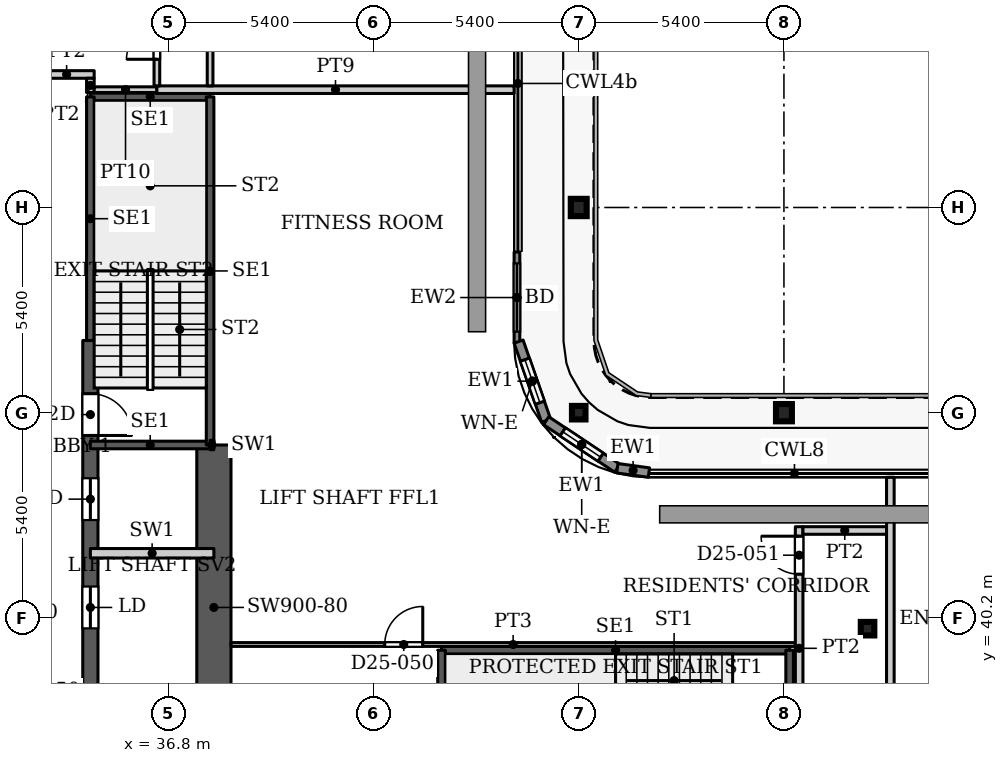
"""IFC4 building model, lengths in metres.
Left out: names, types, materials, properties, quantities, classifications, styles, units other than length and angle.
Written with IfcOpenShell. Run it as: python <this file> out.ifc"""

import sys

from ifc_helpers import new_model, si_unit, direction, frame, frame_2d, origin, origin_2d, place, context, subcontext, project, spatial, rectangle, hollow_rectangle, i_section, extrude, source, transform, mapped, element, fill, save


model = new_model("IFC4")
c1 = context("Model", 3, precision=1e-05, world=origin(), true_north=direction((0.0, 1.0)))
c2 = subcontext(c1, "Body", "Model", "MODEL_VIEW")
j1 = project(units=[si_unit("LENGTHUNIT", "METRE"), si_unit("PLANEANGLEUNIT", "RADIAN")], contexts=[c1])
p1 = place(None, origin())
s1 = spatial("IfcSite", under=j1, at=p1, CompositionType="ELEMENT")
p2 = place(p1, origin())
s2 = spatial("IfcBuilding", under=s1, at=p2, CompositionType="ELEMENT")
p3 = place(p2, frame((0.0, 0.0, 109.7)))
s3 = spatial("IfcBuildingStorey", under=s2, at=p3, CompositionType="ELEMENT", Elevation=109.7)
for number, where, z_axis, x_axis in (
    (1, (53.0, 45.6, 0.0), (0.0, 0.0, 1.0), (1.0, 0.0, 0.0)),
    (2, (47.6, 51.0, 0.0), (0.0, 0.0, 1.0), (1.0, 0.0, 0.0)),
):
    element("IfcColumn", number, at=place(p3, frame(where, z_axis=z_axis, x_axis=x_axis)), inside=s3, PredefinedType="COLUMN", context=c2, shape_type="SweptSolid", body=[
        extrude(i_section(OverallWidth=0.418, OverallDepth=0.455, WebThickness=0.042, FlangeThickness=0.068, FilletRadius=0.014, at=origin_2d()), origin(), (0.0, 0.0, 1.0), 3.9),
    ])
for number, where, z_axis, x_axis in (
    (3, (55.2, 39.916, 0.0), (0.0, 0.0, 1.0), (1.0, 0.0, 0.0)),
    (4, (47.6, 45.6, 0.0), (0.0, 0.0, 1.0), (1.0, 0.0, 0.0)),
):
    element("IfcColumn", number, at=place(p3, frame(where, z_axis=z_axis, x_axis=x_axis)), inside=s3, PredefinedType="COLUMN", context=c2, shape_type="SweptSolid", body=[
        extrude(hollow_rectangle(XDim=0.356, YDim=0.356, WallThickness=0.016, InnerFilletRadius=0.016, OuterFilletRadius=0.032, at=origin_2d()), origin(), (0.0, 0.0, 1.0), 3.9),
    ])
p4 = place(p3, frame((34.75, 29.05, 0.0), z_axis=(0.0, 0.0, 1.0), x_axis=(0.0, 1.0, 0.0)))
e5 = element("IfcWall", 5, at=p4, inside=s3, PredefinedType="SHEAR", context=c2, shape_type="SweptSolid", body=[
    extrude(rectangle(XDim=18.45, YDim=0.4, at=frame_2d((9.225, 0.0))), origin(), (0.0, 0.0, 1.0), 3.9),
])
p5 = place(p4, frame((8.025, 0.0, 0.0)))
e6 = element("IfcOpeningElement", 6, at=p5, cuts=e5, PredefinedType="OPENING", context=c2, shape_type="SweptSolid", body=[
    extrude(rectangle(XDim=1.1, YDim=2.2, at=frame_2d((0.55, 1.1))), frame((0.0, 0.21, 0.0), z_axis=(0.0, -1.0, 0.0), x_axis=(1.0, 0.0, 0.0)), (0.0, 0.0, 1.0), 0.42),
])
p6 = place(p4, frame((10.875, 0.0, 0.0)))
e7 = element("IfcOpeningElement", 7, at=p6, cuts=e5, PredefinedType="OPENING", context=c2, shape_type="SweptSolid", body=[
    extrude(rectangle(XDim=1.1, YDim=2.2, at=frame_2d((0.55, 1.1))), frame((0.0, 0.21, 0.0), z_axis=(0.0, -1.0, 0.0), x_axis=(1.0, 0.0, 0.0)), (0.0, 0.0, 1.0), 0.42),
])
p7 = place(p4, frame((13.725, 0.0, 0.0)))
e8 = element("IfcOpeningElement", 8, at=p7, cuts=e5, PredefinedType="OPENING", context=c2, shape_type="SweptSolid", body=[
    extrude(rectangle(XDim=1.1, YDim=2.2, at=frame_2d((0.55, 1.1))), frame((0.0, 0.21, 0.0), z_axis=(0.0, -1.0, 0.0), x_axis=(1.0, 0.0, 0.0)), (0.0, 0.0, 1.0), 0.42),
])
p8 = place(p4, frame((15.95, 0.0, 0.0)))
e9 = element("IfcOpeningElement", 9, at=p8, cuts=e5, PredefinedType="OPENING", context=c2, shape_type="SweptSolid", body=[
    extrude(rectangle(XDim=1.1, YDim=2.2, at=frame_2d((0.55, 1.1))), frame((0.0, 0.21, 0.0), z_axis=(0.0, -1.0, 0.0), x_axis=(1.0, 0.0, 0.0)), (0.0, 0.0, 1.0), 0.42),
])
p9 = place(p3, frame((38.0, 36.2, 0.0), z_axis=(0.0, 0.0, 1.0), x_axis=(0.0, 1.0, 0.0)))
e10 = element("IfcWall", 10, at=p9, inside=s3, PredefinedType="SHEAR", context=c2, shape_type="SweptSolid", body=[
    extrude(rectangle(XDim=8.55, YDim=0.9, at=frame_2d((4.275, 0.0))), origin(), (0.0, 0.0, 1.0), 3.9),
])
p10 = place(p3, frame((45.975, 49.83, 0.0), z_axis=(0.0, 0.0, 1.0), x_axis=(0.0, -1.0, 0.0)))
e11 = element("IfcWall", 11, at=p10, inside=s3, PredefinedType="SOLIDWALL", context=c2, shape_type="SweptSolid", body=[
    extrude(rectangle(XDim=2.4, YDim=0.15, at=frame_2d((1.2, 0.0))), origin(), (0.0, 0.0, 1.0), 3.75),
])
p11 = place(p10, frame((0.3, 0.0, 0.0)))
e12 = element("IfcOpeningElement", 12, at=p11, cuts=e11, PredefinedType="OPENING", context=c2, shape_type="SweptSolid", body=[
    extrude(rectangle(XDim=1.8, YDim=2.4, at=frame_2d((0.9, 1.2))), frame((0.0, 0.085, 0.0), z_axis=(0.0, -1.0, 0.0), x_axis=(1.0, 0.0, 0.0)), (0.0, 0.0, 1.0), 0.17),
])
p12 = place(p3, frame((46.018, 47.471, 0.0), z_axis=(0.0, 0.0, 1.0), x_axis=(0.328791208903, -0.944402637093, 0.0)))
e13 = element("IfcWall", 13, at=p12, inside=s3, PredefinedType="SOLIDWALL", context=c2, shape_type="SweptSolid", body=[
    extrude(rectangle(XDim=2.205, YDim=0.25, at=frame_2d((1.102, 0.0))), origin(), (0.0, 0.0, 1.0), 3.75),
])
p13 = place(p12, frame((0.503, 0.0, 0.6)))
e14 = element("IfcOpeningElement", 14, at=p13, cuts=e13, PredefinedType="OPENING", context=c2, shape_type="SweptSolid", body=[
    extrude(rectangle(XDim=1.2, YDim=2.1, at=frame_2d((0.6, 1.05))), frame((0.0, 0.135, 0.0), z_axis=(0.0, -1.0, 0.0), x_axis=(1.0, 0.0, 0.0)), (0.0, 0.0, 1.0), 0.27),
])
p14 = place(p3, frame((46.743, 45.389, 0.0), z_axis=(0.0, 0.0, 1.0), x_axis=(0.831449265529, -0.555600682912, 0.0)))
e15 = element("IfcWall", 15, at=p14, inside=s3, PredefinedType="SOLIDWALL", context=c2, shape_type="SweptSolid", body=[
    extrude(rectangle(XDim=2.251, YDim=0.25, at=frame_2d((1.126, 0.0))), origin(), (0.0, 0.0, 1.0), 3.75),
])
p15 = place(p14, frame((0.525, 0.0, 0.6)))
e16 = element("IfcOpeningElement", 16, at=p15, cuts=e15, PredefinedType="OPENING", context=c2, shape_type="SweptSolid", body=[
    extrude(rectangle(XDim=1.2, YDim=2.1, at=frame_2d((0.6, 1.05))), frame((0.0, 0.135, 0.0), z_axis=(0.0, -1.0, 0.0), x_axis=(1.0, 0.0, 0.0)), (0.0, 0.0, 1.0), 0.27),
])
p16 = place(p3, frame((48.615, 44.138, 0.0), z_axis=(0.0, 0.0, 1.0), x_axis=(0.990741504246, -0.135761819977, 0.0)))
e17 = element("IfcWall", 17, at=p16, inside=s3, PredefinedType="SOLIDWALL", context=c2, shape_type="SweptSolid", body=[
    extrude(rectangle(XDim=0.84, YDim=0.25, at=frame_2d((0.42, 0.0))), origin(), (0.0, 0.0, 1.0), 3.75),
])
p17 = place(p3, frame((43.99, 39.35, 0.0), z_axis=(0.0, 0.0, 1.0), x_axis=(1.0, 0.0, 0.0)))
e18 = element("IfcWall", 18, at=p17, inside=s3, PredefinedType="SHEAR", context=c2, shape_type="SweptSolid", body=[
    extrude(rectangle(XDim=9.16, YDim=0.2, at=frame_2d((4.58, 0.0))), origin(), (0.0, 0.0, 1.0), 3.9),
])
for number, where, z_axis, x_axis in (
    (19, (43.99, 36.2, 0.0), (0.0, 0.0, 1.0), (0.0, 1.0, 0.0)),
    (20, (53.15, 36.2, 0.0), (0.0, 0.0, 1.0), (0.0, 1.0, 0.0)),
):
    element("IfcWall", number, at=place(p3, frame(where, z_axis=z_axis, x_axis=x_axis)), inside=s3, PredefinedType="SHEAR", context=c2, shape_type="SweptSolid", body=[
        extrude(rectangle(XDim=3.15, YDim=0.2, at=frame_2d((1.575, 0.0))), origin(), (0.0, 0.0, 1.0), 3.9),
    ])
for number, where, z_axis, x_axis in (
    (21, (34.75, 44.75, 0.0), (0.0, 0.0, 1.0), (1.0, 0.0, 0.0)),
    (22, (34.75, 53.91, 0.0), (0.0, 0.0, 1.0), (1.0, 0.0, 0.0)),
):
    element("IfcWall", number, at=place(p3, frame(where, z_axis=z_axis, x_axis=x_axis)), inside=s3, PredefinedType="SHEAR", context=c2, shape_type="SweptSolid", body=[
        extrude(rectangle(XDim=3.15, YDim=0.2, at=frame_2d((1.575, 0.0))), origin(), (0.0, 0.0, 1.0), 3.9),
    ])
p18 = place(p3, frame((34.75, 47.5, 0.0), z_axis=(0.0, 0.0, 1.0), x_axis=(0.0, 1.0, 0.0)))
e23 = element("IfcWall", 23, at=p18, inside=s3, PredefinedType="SHEAR", context=c2, shape_type="SweptSolid", body=[
    extrude(rectangle(XDim=6.41, YDim=0.2, at=frame_2d((3.205, 0.0))), origin(), (0.0, 0.0, 1.0), 3.9),
])
p19 = place(p3, frame((37.9, 44.75, 0.0), z_axis=(0.0, 0.0, 1.0), x_axis=(0.0, 1.0, 0.0)))
e24 = element("IfcWall", 24, at=p19, inside=s3, PredefinedType="SHEAR", context=c2, shape_type="SweptSolid", body=[
    extrude(rectangle(XDim=9.16, YDim=0.2, at=frame_2d((4.58, 0.0))), origin(), (0.0, 0.0, 1.0), 3.9),
])
p20 = place(p3, frame((34.75, 41.9, 0.0), z_axis=(0.0, 0.0, 1.0), x_axis=(1.0, 0.0, 0.0)))
e25 = element("IfcWall", 25, at=p20, inside=s3, PredefinedType="PARTITIONING", context=c2, shape_type="SweptSolid", body=[
    extrude(rectangle(XDim=3.25, YDim=0.25, at=frame_2d((1.625, 0.0))), origin(), (0.0, 0.0, 1.0), 3.9),
])
p21 = place(p3, frame((37.9, 44.75, 0.0), z_axis=(0.0, 0.0, 1.0), x_axis=(1.0, 0.0, 0.0)))
e26 = element("IfcWall", 26, at=p21, inside=s3, PredefinedType="PARTITIONING", context=c2, shape_type="SweptSolid", body=[
    extrude(rectangle(XDim=0.1, YDim=0.25, at=frame_2d((0.05, 0.0))), origin(), (0.0, 0.0, 1.0), 3.9),
])
p22 = place(p3, frame((33.4, 54.5, 0.0), z_axis=(0.0, 0.0, 1.0), x_axis=(1.0, 0.0, 0.0)))
e27 = element("IfcWall", 27, at=p22, inside=s3, PredefinedType="PARTITIONING", context=c2, shape_type="SweptSolid", body=[
    extrude(rectangle(XDim=1.45, YDim=0.2, at=frame_2d((0.725, 0.0))), origin(), (0.0, 0.0, 1.0), 3.6),
])
p23 = place(p3, frame((34.75, 54.025, 0.0), z_axis=(0.0, 0.0, 1.0), x_axis=(0.0, 1.0, 0.0)))
e28 = element("IfcWall", 28, at=p23, inside=s3, PredefinedType="PARTITIONING", context=c2, shape_type="SweptSolid", body=[
    extrude(rectangle(XDim=0.375, YDim=0.2, at=frame_2d((0.188, 0.0))), origin(), (0.0, 0.0, 1.0), 3.6),
])
p24 = place(p3, frame((34.85, 54.1, 0.0), z_axis=(0.0, 0.0, 1.0), x_axis=(1.0, 0.0, 0.0)))
e29 = element("IfcWall", 29, at=p24, inside=s3, PredefinedType="PARTITIONING", context=c2, shape_type="SweptSolid", body=[
    extrude(rectangle(XDim=1.65, YDim=0.15, at=frame_2d((0.825, 0.0))), origin(), (0.0, 0.0, 1.0), 3.6),
])
p25 = place(p3, frame((36.5, 54.1, 0.0), z_axis=(0.0, 0.0, 1.0), x_axis=(1.0, 0.0, 0.0)))
e30 = element("IfcWall", 30, at=p25, inside=s3, PredefinedType="PARTITIONING", context=c2, shape_type="SweptSolid", body=[
    extrude(rectangle(XDim=9.4, YDim=0.2, at=frame_2d((4.7, 0.0))), origin(), (0.0, 0.0, 1.0), 3.6),
])
p26 = place(p3, frame((36.5, 54.2, 0.0), z_axis=(0.0, 0.0, 1.0), x_axis=(0.0, 1.0, 0.0)))
e31 = element("IfcWall", 31, at=p26, inside=s3, PredefinedType="PARTITIONING", context=c2, shape_type="SweptSolid", body=[
    extrude(rectangle(XDim=2.225, YDim=0.15, at=frame_2d((1.113, 0.0))), origin(), (0.0, 0.0, 1.0), 3.6),
])
p27 = place(p26, frame((0.7, 0.0, 0.0)))
e32 = element("IfcOpeningElement", 32, at=p27, cuts=e31, PredefinedType="OPENING", context=c2, shape_type="SweptSolid", body=[
    extrude(rectangle(XDim=0.8, YDim=2.1, at=frame_2d((0.4, 1.05))), frame((0.0, 0.085, 0.0), z_axis=(0.0, -1.0, 0.0), x_axis=(1.0, 0.0, 0.0)), (0.0, 0.0, 1.0), 0.17),
])
p28 = place(p3, frame((37.9, 54.2, 0.0), z_axis=(0.0, 0.0, 1.0), x_axis=(0.0, 1.0, 0.0)))
e33 = element("IfcWall", 33, at=p28, inside=s3, PredefinedType="PARTITIONING", context=c2, shape_type="SweptSolid", body=[
    extrude(rectangle(XDim=9.1, YDim=0.15, at=frame_2d((4.55, 0.0))), origin(), (0.0, 0.0, 1.0), 3.6),
])
p29 = place(p28, frame((6.8, 0.0, 0.0)))
e34 = element("IfcOpeningElement", 34, at=p29, cuts=e33, PredefinedType="OPENING", context=c2, shape_type="SweptSolid", body=[
    extrude(rectangle(XDim=0.9, YDim=2.1, at=frame_2d((0.45, 1.05))), frame((0.0, 0.085, 0.0), z_axis=(0.0, -1.0, 0.0), x_axis=(1.0, 0.0, 0.0)), (0.0, 0.0, 1.0), 0.17),
])
p30 = place(p28, frame((2.1, 0.0, 0.0)))
e35 = element("IfcOpeningElement", 35, at=p30, cuts=e33, PredefinedType="OPENING", context=c2, shape_type="SweptSolid", body=[
    extrude(rectangle(XDim=1.0, YDim=2.1, at=frame_2d((0.5, 1.05))), frame((0.0, 0.085, 0.0), z_axis=(0.0, -1.0, 0.0), x_axis=(1.0, 0.0, 0.0)), (0.0, 0.0, 1.0), 0.17),
])
p31 = place(p3, frame((38.449, 39.5, 0.0), z_axis=(0.0, 0.0, 1.0), x_axis=(1.0, 0.0, 0.0)))
e36 = element("IfcWall", 36, at=p31, inside=s3, PredefinedType="PARTITIONING", context=c2, shape_type="SweptSolid", body=[
    extrude(rectangle(XDim=14.851, YDim=0.1, at=frame_2d((7.426, 0.0))), origin(), (0.0, 0.0, 1.0), 3.6),
])
p32 = place(p31, frame((4.047, 0.0, 0.0)))
e37 = element("IfcOpeningElement", 37, at=p32, cuts=e36, PredefinedType="OPENING", context=c2, shape_type="SweptSolid", body=[
    extrude(rectangle(XDim=1.0, YDim=2.1, at=frame_2d((0.5, 1.05))), frame((0.0, 0.06, 0.0), z_axis=(0.0, -1.0, 0.0), x_axis=(1.0, 0.0, 0.0)), (0.0, 0.0, 1.0), 0.12),
])
p33 = place(p3, frame((53.4, 36.199, 0.0), z_axis=(0.0, 0.0, 1.0), x_axis=(0.0, 1.0, 0.0)))
e38 = element("IfcWall", 38, at=p33, inside=s3, PredefinedType="PARTITIONING", context=c2, shape_type="SweptSolid", body=[
    extrude(rectangle(XDim=6.401, YDim=0.2, at=frame_2d((3.201, 0.0))), origin(), (0.0, 0.0, 1.0), 3.6),
])
p34 = place(p33, frame((5.151, 0.0, 0.0)))
e39 = element("IfcOpeningElement", 39, at=p34, cuts=e38, PredefinedType="OPENING", context=c2, shape_type="SweptSolid", body=[
    extrude(rectangle(XDim=1.0, YDim=2.1, at=frame_2d((0.5, 1.05))), frame((0.0, 0.11, 0.0), z_axis=(0.0, -1.0, 0.0), x_axis=(1.0, 0.0, 0.0)), (0.0, 0.0, 1.0), 0.22),
])
p35 = place(p3, frame((53.5, 42.5, 0.0), z_axis=(0.0, 0.0, 1.0), x_axis=(1.0, 0.0, 0.0)))
e40 = element("IfcWall", 40, at=p35, inside=s3, PredefinedType="PARTITIONING", context=c2, shape_type="SweptSolid", body=[
    extrude(rectangle(XDim=2.2, YDim=0.2, at=frame_2d((1.1, 0.0))), origin(), (0.0, 0.0, 1.0), 3.6),
])
p36 = place(p3, frame((55.8, 30.4, 0.0), z_axis=(0.0, 0.0, 1.0), x_axis=(0.0, 1.0, 0.0)))
e41 = element("IfcWall", 41, at=p36, inside=s3, PredefinedType="PARTITIONING", context=c2, shape_type="SweptSolid", body=[
    extrude(rectangle(XDim=13.5, YDim=0.2, at=frame_2d((6.75, 0.0))), origin(), (0.0, 0.0, 1.0), 3.6),
])
m1 = source(origin(), c2, "Body", "SweptSolid", [
    extrude(rectangle(XDim=1.8, YDim=2.4, at=frame_2d((0.9, 1.2))), frame((0.0, 0.025, 0.0), z_axis=(0.0, -1.0, 0.0), x_axis=(1.0, 0.0, 0.0)), (0.0, 0.0, 1.0), 0.05),
])
p37 = place(p11, origin())
e42 = element("IfcDoor", 42, at=p37, inside=s3, OperationType="SLIDING_TO_LEFT", PredefinedType="DOOR", context=c2, shape_type="MappedRepresentation", body=[
    mapped(m1, transform((0.0, 0.0, 0.0), x_axis=(1.0, 0.0, 0.0), y_axis=(0.0, 1.0, 0.0), z_axis=(0.0, 0.0, 1.0), scale=1.0)),
])
fill(e12, e42)
m2 = source(origin(), c2, "Body", "SweptSolid", [
    extrude(rectangle(XDim=1.2, YDim=2.1, at=frame_2d((0.6, 1.05))), frame((0.0, 0.03, 0.0), z_axis=(0.0, -1.0, 0.0), x_axis=(1.0, 0.0, 0.0)), (0.0, 0.0, 1.0), 0.06),
])
p38 = place(p13, origin())
e43 = element("IfcWindow", 43, at=p38, inside=s3, PartitioningType="SINGLE_PANEL", PredefinedType="WINDOW", context=c2, shape_type="MappedRepresentation", body=[
    mapped(m2, transform((0.0, 0.0, 0.0), x_axis=(1.0, 0.0, 0.0), y_axis=(0.0, 1.0, 0.0), z_axis=(0.0, 0.0, 1.0), scale=1.0)),
])
fill(e14, e43)
p39 = place(p15, origin())
e44 = element("IfcWindow", 44, at=p39, inside=s3, PartitioningType="SINGLE_PANEL", PredefinedType="WINDOW", context=c2, shape_type="MappedRepresentation", body=[
    mapped(m2, transform((0.0, 0.0, 0.0), x_axis=(1.0, 0.0, 0.0), y_axis=(0.0, 1.0, 0.0), z_axis=(0.0, 0.0, 1.0), scale=1.0)),
])
fill(e16, e44)
m3 = source(origin(), c2, "Body", "SweptSolid", [
    extrude(rectangle(XDim=1.1, YDim=2.2, at=frame_2d((0.55, 1.1))), frame((0.0, 0.025, 0.0), z_axis=(0.0, -1.0, 0.0), x_axis=(1.0, 0.0, 0.0)), (0.0, 0.0, 1.0), 0.05),
])
p40 = place(p6, origin())
e45 = element("IfcDoor", 45, at=p40, inside=s3, OperationType="SLIDING_TO_LEFT", PredefinedType="DOOR", context=c2, shape_type="MappedRepresentation", body=[
    mapped(m3, transform((0.0, 0.0, 0.0), x_axis=(1.0, 0.0, 0.0), y_axis=(0.0, 1.0, 0.0), z_axis=(0.0, 0.0, 1.0), scale=1.0)),
])
fill(e7, e45)
p41 = place(p7, origin())
e46 = element("IfcDoor", 46, at=p41, inside=s3, OperationType="SLIDING_TO_LEFT", PredefinedType="DOOR", context=c2, shape_type="MappedRepresentation", body=[
    mapped(m3, transform((0.0, 0.0, 0.0), x_axis=(1.0, 0.0, 0.0), y_axis=(0.0, 1.0, 0.0), z_axis=(0.0, 0.0, 1.0), scale=1.0)),
])
fill(e8, e46)
m4 = source(origin(), c2, "Body", "SweptSolid", [
    extrude(rectangle(XDim=1.1, YDim=2.2, at=frame_2d((0.55, 1.1))), frame((0.0, 0.025, 0.0), z_axis=(0.0, -1.0, 0.0), x_axis=(1.0, 0.0, 0.0)), (0.0, 0.0, 1.0), 0.05),
])
p42 = place(p8, origin())
e47 = element("IfcDoor", 47, at=p42, inside=s3, OperationType="SINGLE_SWING_RIGHT", PredefinedType="DOOR", context=c2, shape_type="MappedRepresentation", body=[
    mapped(m4, transform((0.0, 0.0, 0.0), x_axis=(1.0, 0.0, 0.0), y_axis=(0.0, 1.0, 0.0), z_axis=(0.0, 0.0, 1.0), scale=1.0)),
])
fill(e9, e47)
m5 = source(origin(), c2, "Body", "SweptSolid", [
    extrude(rectangle(XDim=0.8, YDim=2.1, at=frame_2d((0.4, 1.05))), frame((0.0, 0.025, 0.0), z_axis=(0.0, -1.0, 0.0), x_axis=(1.0, 0.0, 0.0)), (0.0, 0.0, 1.0), 0.05),
])
p43 = place(p27, origin())
e48 = element("IfcDoor", 48, at=p43, inside=s3, OperationType="SINGLE_SWING_LEFT", PredefinedType="DOOR", context=c2, shape_type="MappedRepresentation", body=[
    mapped(m5, transform((0.0, 0.0, 0.0), x_axis=(1.0, 0.0, 0.0), y_axis=(0.0, 1.0, 0.0), z_axis=(0.0, 0.0, 1.0), scale=1.0)),
])
fill(e32, e48)
m6 = source(origin(), c2, "Body", "SweptSolid", [
    extrude(rectangle(XDim=1.0, YDim=2.1, at=frame_2d((0.5, 1.05))), frame((0.0, 0.025, 0.0), z_axis=(0.0, -1.0, 0.0), x_axis=(1.0, 0.0, 0.0)), (0.0, 0.0, 1.0), 0.05),
])
p44 = place(p32, origin())
e49 = element("IfcDoor", 49, at=p44, inside=s3, OperationType="SINGLE_SWING_LEFT", PredefinedType="DOOR", context=c2, shape_type="MappedRepresentation", body=[
    mapped(m6, transform((0.0, 0.0, 0.0), x_axis=(1.0, 0.0, 0.0), y_axis=(0.0, 1.0, 0.0), z_axis=(0.0, 0.0, 1.0), scale=1.0)),
])
fill(e37, e49)
m7 = source(origin(), c2, "Body", "SweptSolid", [
    extrude(rectangle(XDim=1.0, YDim=2.1, at=frame_2d((0.5, 1.05))), frame((0.0, 0.025, 0.0), z_axis=(0.0, -1.0, 0.0), x_axis=(1.0, 0.0, 0.0)), (0.0, 0.0, 1.0), 0.05),
])
p45 = place(p34, origin())
e50 = element("IfcDoor", 50, at=p45, inside=s3, OperationType="SINGLE_SWING_LEFT", PredefinedType="DOOR", context=c2, shape_type="MappedRepresentation", body=[
    mapped(m7, transform((0.0, 0.0, 0.0), x_axis=(1.0, 0.0, 0.0), y_axis=(0.0, 1.0, 0.0), z_axis=(0.0, 0.0, 1.0), scale=1.0)),
])
fill(e39, e50)
save(model, sys.argv[1])
